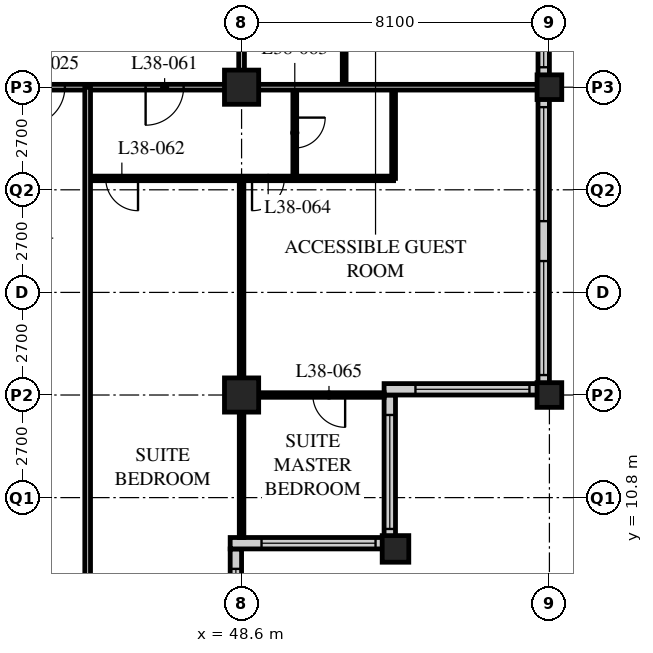
"""IFC4 building model, lengths in metres.
Left out: names, types, materials, properties, quantities, classifications, styles, units other than length and angle.
Written with IfcOpenShell. Run it as: python <this file> out.ifc"""

import sys

from ifc_helpers import new_model, si_unit, direction, frame, frame_2d, origin, origin_2d, place, context, subcontext, project, spatial, rectangle, hollow_rectangle, extrude, element, fill, save


model = new_model("IFC4")
c1 = context("Model", 3, precision=1e-05, world=origin(), true_north=direction((0.0, 1.0)))
c2 = subcontext(c1, "Body", "Model", "MODEL_VIEW")
j1 = project(units=[si_unit("LENGTHUNIT", "METRE"), si_unit("PLANEANGLEUNIT", "RADIAN")], contexts=[c1])
p1 = place(None, origin())
s1 = spatial("IfcSite", under=j1, at=p1, CompositionType="ELEMENT")
p2 = place(p1, origin())
s2 = spatial("IfcBuilding", under=s1, at=p2, CompositionType="ELEMENT")
p3 = place(p2, frame((0.0, 0.0, 147.6)))
s3 = spatial("IfcBuildingStorey", under=s2, at=p3, CompositionType="ELEMENT", Elevation=147.6)
for number, where, z_axis, x_axis in (
    (1, (48.6, 13.5, 0.0), (0.0, 0.0, 1.0), (1.0, 0.0, 0.0)),
    (2, (48.6, 21.6, 0.0), (0.0, 0.0, 1.0), (1.0, 0.0, 0.0)),
):
    element("IfcColumn", number, at=place(p3, frame(where, z_axis=z_axis, x_axis=x_axis)), inside=s3, PredefinedType="COLUMN", context=c2, shape_type="SweptSolid", body=[
        extrude(hollow_rectangle(XDim=0.9, YDim=0.9, WallThickness=0.1, at=origin_2d()), origin(), (0.0, 0.0, 1.0), 3.4),
    ])
p4 = place(p3, frame((52.65, 9.45, 0.0), z_axis=(0.0, 0.0, 1.0), x_axis=(1.0, 0.0, 0.0)))
e3 = element("IfcColumn", 3, at=p4, inside=s3, PredefinedType="COLUMN", context=c2, shape_type="SweptSolid", body=[
    extrude(hollow_rectangle(XDim=0.7, YDim=0.7, WallThickness=0.07, at=origin_2d()), origin(), (0.0, 0.0, 1.0), 3.4),
])
for number, where, z_axis, x_axis in (
    (4, (56.7, 13.5, 0.0), (0.0, 0.0, 1.0), (1.0, 0.0, 0.0)),
    (5, (56.7, 21.6, 0.0), (0.0, 0.0, 1.0), (1.0, 0.0, 0.0)),
):
    element("IfcColumn", number, at=place(p3, frame(where, z_axis=z_axis, x_axis=x_axis)), inside=s3, PredefinedType="COLUMN", context=c2, shape_type="SweptSolid", body=[
        extrude(hollow_rectangle(XDim=0.65, YDim=0.65, WallThickness=0.055, at=origin_2d()), origin(), (0.0, 0.0, 1.0), 3.4),
    ])
p5 = place(p3, frame((48.45, 5.7, 0.0), z_axis=(0.0, 0.0, 1.0), x_axis=(0.0, 1.0, 0.0)))
e6 = element("IfcWall", 6, at=p5, inside=s3, PredefinedType="SOLIDWALL", context=c2, shape_type="SweptSolid", body=[
    extrude(rectangle(XDim=3.75, YDim=0.3, at=frame_2d((1.875, 0.0))), origin(), (0.0, 0.0, 1.0), 3.19),
])
p6 = place(p5, frame((0.225, 0.0, 0.9)))
e7 = element("IfcOpeningElement", 7, at=p6, cuts=e6, PredefinedType="OPENING", context=c2, shape_type="SweptSolid", body=[
    extrude(rectangle(XDim=3.0, YDim=1.4, at=frame_2d((1.5, 0.7))), frame((0.0, 0.16, 0.0), z_axis=(0.0, -1.0, 0.0), x_axis=(1.0, 0.0, 0.0)), (0.0, 0.0, 1.0), 0.32),
])
p7 = place(p3, frame((48.3, 9.6, 0.0), z_axis=(0.0, 0.0, 1.0), x_axis=(1.0, 0.0, 0.0)))
e8 = element("IfcWall", 8, at=p7, inside=s3, PredefinedType="SOLIDWALL", context=c2, shape_type="SweptSolid", body=[
    extrude(rectangle(XDim=4.35, YDim=0.3, at=frame_2d((2.175, 0.0))), origin(), (0.0, 0.0, 1.0), 3.19),
])
p8 = place(p7, frame((0.825, 0.0, 0.9)))
e9 = element("IfcOpeningElement", 9, at=p8, cuts=e8, PredefinedType="OPENING", context=c2, shape_type="SweptSolid", body=[
    extrude(rectangle(XDim=3.0, YDim=1.4, at=frame_2d((1.5, 0.7))), frame((0.0, 0.16, 0.0), z_axis=(0.0, -1.0, 0.0), x_axis=(1.0, 0.0, 0.0)), (0.0, 0.0, 1.0), 0.32),
])
p9 = place(p3, frame((52.5, 9.75, 0.0), z_axis=(0.0, 0.0, 1.0), x_axis=(0.0, 1.0, 0.0)))
e10 = element("IfcWall", 10, at=p9, inside=s3, PredefinedType="SOLIDWALL", context=c2, shape_type="SweptSolid", body=[
    extrude(rectangle(XDim=3.75, YDim=0.3, at=frame_2d((1.875, 0.0))), origin(), (0.0, 0.0, 1.0), 3.19),
])
p10 = place(p9, frame((0.225, 0.0, 0.9)))
e11 = element("IfcOpeningElement", 11, at=p10, cuts=e10, PredefinedType="OPENING", context=c2, shape_type="SweptSolid", body=[
    extrude(rectangle(XDim=3.0, YDim=1.4, at=frame_2d((1.5, 0.7))), frame((0.0, 0.16, 0.0), z_axis=(0.0, -1.0, 0.0), x_axis=(1.0, 0.0, 0.0)), (0.0, 0.0, 1.0), 0.32),
])
p11 = place(p3, frame((52.35, 13.65, 0.0), z_axis=(0.0, 0.0, 1.0), x_axis=(1.0, 0.0, 0.0)))
e12 = element("IfcWall", 12, at=p11, inside=s3, PredefinedType="SOLIDWALL", context=c2, shape_type="SweptSolid", body=[
    extrude(rectangle(XDim=4.35, YDim=0.3, at=frame_2d((2.175, 0.0))), origin(), (0.0, 0.0, 1.0), 3.19),
])
p12 = place(p11, frame((0.825, 0.0, 0.9)))
e13 = element("IfcOpeningElement", 13, at=p12, cuts=e12, PredefinedType="OPENING", context=c2, shape_type="SweptSolid", body=[
    extrude(rectangle(XDim=3.0, YDim=1.4, at=frame_2d((1.5, 0.7))), frame((0.0, 0.16, 0.0), z_axis=(0.0, -1.0, 0.0), x_axis=(1.0, 0.0, 0.0)), (0.0, 0.0, 1.0), 0.32),
])
p13 = place(p3, frame((56.55, 13.8, 0.0), z_axis=(0.0, 0.0, 1.0), x_axis=(0.0, 1.0, 0.0)))
e14 = element("IfcWall", 14, at=p13, inside=s3, PredefinedType="SOLIDWALL", context=c2, shape_type="SweptSolid", body=[
    extrude(rectangle(XDim=32.1, YDim=0.3, at=frame_2d((16.05, 0.0))), origin(), (0.0, 0.0, 1.0), 3.19),
])
p14 = place(p13, frame((0.225, 0.0, 0.9)))
e15 = element("IfcOpeningElement", 15, at=p14, cuts=e14, PredefinedType="OPENING", context=c2, shape_type="SweptSolid", body=[
    extrude(rectangle(XDim=3.0, YDim=1.4, at=frame_2d((1.5, 0.7))), frame((0.0, 0.16, 0.0), z_axis=(0.0, -1.0, 0.0), x_axis=(1.0, 0.0, 0.0)), (0.0, 0.0, 1.0), 0.32),
])
p15 = place(p13, frame((4.275, 0.0, 0.9)))
e16 = element("IfcOpeningElement", 16, at=p15, cuts=e14, PredefinedType="OPENING", context=c2, shape_type="SweptSolid", body=[
    extrude(rectangle(XDim=3.0, YDim=1.4, at=frame_2d((1.5, 0.7))), frame((0.0, 0.16, 0.0), z_axis=(0.0, -1.0, 0.0), x_axis=(1.0, 0.0, 0.0)), (0.0, 0.0, 1.0), 0.32),
])
p16 = place(p13, frame((8.325, 0.0, 0.9)))
e17 = element("IfcOpeningElement", 17, at=p16, cuts=e14, PredefinedType="OPENING", context=c2, shape_type="SweptSolid", body=[
    extrude(rectangle(XDim=3.0, YDim=1.4, at=frame_2d((1.5, 0.7))), frame((0.0, 0.16, 0.0), z_axis=(0.0, -1.0, 0.0), x_axis=(1.0, 0.0, 0.0)), (0.0, 0.0, 1.0), 0.32),
])
p17 = place(p13, frame((12.375, 0.0, 0.9)))
e18 = element("IfcOpeningElement", 18, at=p17, cuts=e14, PredefinedType="OPENING", context=c2, shape_type="SweptSolid", body=[
    extrude(rectangle(XDim=3.0, YDim=1.4, at=frame_2d((1.5, 0.7))), frame((0.0, 0.16, 0.0), z_axis=(0.0, -1.0, 0.0), x_axis=(1.0, 0.0, 0.0)), (0.0, 0.0, 1.0), 0.32),
])
p18 = place(p13, frame((16.425, 0.0, 0.9)))
e19 = element("IfcOpeningElement", 19, at=p18, cuts=e14, PredefinedType="OPENING", context=c2, shape_type="SweptSolid", body=[
    extrude(rectangle(XDim=3.0, YDim=1.4, at=frame_2d((1.5, 0.7))), frame((0.0, 0.16, 0.0), z_axis=(0.0, -1.0, 0.0), x_axis=(1.0, 0.0, 0.0)), (0.0, 0.0, 1.0), 0.32),
])
p19 = place(p13, frame((20.475, 0.0, 0.9)))
e20 = element("IfcOpeningElement", 20, at=p19, cuts=e14, PredefinedType="OPENING", context=c2, shape_type="SweptSolid", body=[
    extrude(rectangle(XDim=3.0, YDim=1.4, at=frame_2d((1.5, 0.7))), frame((0.0, 0.16, 0.0), z_axis=(0.0, -1.0, 0.0), x_axis=(1.0, 0.0, 0.0)), (0.0, 0.0, 1.0), 0.32),
])
p20 = place(p13, frame((24.525, 0.0, 0.9)))
e21 = element("IfcOpeningElement", 21, at=p20, cuts=e14, PredefinedType="OPENING", context=c2, shape_type="SweptSolid", body=[
    extrude(rectangle(XDim=3.0, YDim=1.4, at=frame_2d((1.5, 0.7))), frame((0.0, 0.16, 0.0), z_axis=(0.0, -1.0, 0.0), x_axis=(1.0, 0.0, 0.0)), (0.0, 0.0, 1.0), 0.32),
])
p21 = place(p13, frame((28.575, 0.0, 0.9)))
e22 = element("IfcOpeningElement", 22, at=p21, cuts=e14, PredefinedType="OPENING", context=c2, shape_type="SweptSolid", body=[
    extrude(rectangle(XDim=3.0, YDim=1.4, at=frame_2d((1.5, 0.7))), frame((0.0, 0.16, 0.0), z_axis=(0.0, -1.0, 0.0), x_axis=(1.0, 0.0, 0.0)), (0.0, 0.0, 1.0), 0.32),
])
p22 = place(p3, frame((12.15, 21.6, 0.0), z_axis=(0.0, 0.0, 1.0), x_axis=(1.0, 0.0, 0.0)))
e23 = element("IfcWall", 23, at=p22, inside=s3, PredefinedType="PARTITIONING", context=c2, shape_type="SweptSolid", body=[
    extrude(rectangle(XDim=36.45, YDim=0.15, at=frame_2d((18.225, 0.0))), origin(), (0.0, 0.0, 1.0), 2.42),
])
p23 = place(p22, frame((5.95, 0.0, 0.0)))
e24 = element("IfcOpeningElement", 24, at=p23, cuts=e23, PredefinedType="OPENING", context=c2, shape_type="SweptSolid", body=[
    extrude(rectangle(XDim=1.0, YDim=2.1, at=frame_2d((0.5, 1.05))), frame((0.0, 0.085, 0.0), z_axis=(0.0, -1.0, 0.0), x_axis=(1.0, 0.0, 0.0)), (0.0, 0.0, 1.0), 0.17),
])
p24 = place(p22, frame((14.05, 0.0, 0.0)))
e25 = element("IfcOpeningElement", 25, at=p24, cuts=e23, PredefinedType="OPENING", context=c2, shape_type="SweptSolid", body=[
    extrude(rectangle(XDim=1.0, YDim=2.1, at=frame_2d((0.5, 1.05))), frame((0.0, 0.085, 0.0), z_axis=(0.0, -1.0, 0.0), x_axis=(1.0, 0.0, 0.0)), (0.0, 0.0, 1.0), 0.17),
])
p25 = place(p22, frame((22.15, 0.0, 0.0)))
e26 = element("IfcOpeningElement", 26, at=p25, cuts=e23, PredefinedType="OPENING", context=c2, shape_type="SweptSolid", body=[
    extrude(rectangle(XDim=1.0, YDim=2.1, at=frame_2d((0.5, 1.05))), frame((0.0, 0.085, 0.0), z_axis=(0.0, -1.0, 0.0), x_axis=(1.0, 0.0, 0.0)), (0.0, 0.0, 1.0), 0.17),
])
p26 = place(p22, frame((30.8, 0.0, 0.0)))
e27 = element("IfcOpeningElement", 27, at=p26, cuts=e23, PredefinedType="OPENING", context=c2, shape_type="SweptSolid", body=[
    extrude(rectangle(XDim=1.0, YDim=2.1, at=frame_2d((0.5, 1.05))), frame((0.0, 0.085, 0.0), z_axis=(0.0, -1.0, 0.0), x_axis=(1.0, 0.0, 0.0)), (0.0, 0.0, 1.0), 0.17),
])
p27 = place(p22, frame((1.525, 0.0, 0.0)))
e28 = element("IfcOpeningElement", 28, at=p27, cuts=e23, PredefinedType="OPENING", context=c2, shape_type="SweptSolid", body=[
    extrude(rectangle(XDim=1.0, YDim=2.1, at=frame_2d((0.5, 1.05))), frame((0.0, 0.085, 0.0), z_axis=(0.0, -1.0, 0.0), x_axis=(1.0, 0.0, 0.0)), (0.0, 0.0, 1.0), 0.17),
])
p28 = place(p22, frame((33.925, 0.0, 0.0)))
e29 = element("IfcOpeningElement", 29, at=p28, cuts=e23, PredefinedType="OPENING", context=c2, shape_type="SweptSolid", body=[
    extrude(rectangle(XDim=1.0, YDim=2.1, at=frame_2d((0.5, 1.05))), frame((0.0, 0.085, 0.0), z_axis=(0.0, -1.0, 0.0), x_axis=(1.0, 0.0, 0.0)), (0.0, 0.0, 1.0), 0.17),
])
p29 = place(p3, frame((48.6, 21.6, 0.0), z_axis=(0.0, 0.0, 1.0), x_axis=(0.0, 1.0, 0.0)))
e30 = element("IfcWall", 30, at=p29, inside=s3, PredefinedType="PARTITIONING", context=c2, shape_type="SweptSolid", body=[
    extrude(rectangle(XDim=24.3, YDim=0.15, at=frame_2d((12.15, 0.0))), origin(), (0.0, 0.0, 1.0), 2.42),
])
p30 = place(p29, frame((2.75, 0.0, 0.0)))
e31 = element("IfcOpeningElement", 31, at=p30, cuts=e30, PredefinedType="OPENING", context=c2, shape_type="SweptSolid", body=[
    extrude(rectangle(XDim=1.0, YDim=2.1, at=frame_2d((0.5, 1.05))), frame((0.0, 0.085, 0.0), z_axis=(0.0, -1.0, 0.0), x_axis=(1.0, 0.0, 0.0)), (0.0, 0.0, 1.0), 0.17),
])
p31 = place(p29, frame((4.65, 0.0, 0.0)))
e32 = element("IfcOpeningElement", 32, at=p31, cuts=e30, PredefinedType="OPENING", context=c2, shape_type="SweptSolid", body=[
    extrude(rectangle(XDim=1.0, YDim=2.1, at=frame_2d((0.5, 1.05))), frame((0.0, 0.085, 0.0), z_axis=(0.0, -1.0, 0.0), x_axis=(1.0, 0.0, 0.0)), (0.0, 0.0, 1.0), 0.17),
])
p32 = place(p29, frame((13.675, 0.0, 0.0)))
e33 = element("IfcOpeningElement", 33, at=p32, cuts=e30, PredefinedType="OPENING", context=c2, shape_type="SweptSolid", body=[
    extrude(rectangle(XDim=1.0, YDim=2.1, at=frame_2d((0.5, 1.05))), frame((0.0, 0.085, 0.0), z_axis=(0.0, -1.0, 0.0), x_axis=(1.0, 0.0, 0.0)), (0.0, 0.0, 1.0), 0.17),
])
p33 = place(p29, frame((20.85, 0.0, 0.0)))
e34 = element("IfcOpeningElement", 34, at=p33, cuts=e30, PredefinedType="OPENING", context=c2, shape_type="SweptSolid", body=[
    extrude(rectangle(XDim=1.0, YDim=2.1, at=frame_2d((0.5, 1.05))), frame((0.0, 0.085, 0.0), z_axis=(0.0, -1.0, 0.0), x_axis=(1.0, 0.0, 0.0)), (0.0, 0.0, 1.0), 0.17),
])
p34 = place(p3, frame((51.3, 21.6, 0.0), z_axis=(0.0, 0.0, 1.0), x_axis=(0.0, 1.0, 0.0)))
e35 = element("IfcWall", 35, at=p34, inside=s3, PredefinedType="PARTITIONING", context=c2, shape_type="SweptSolid", body=[
    extrude(rectangle(XDim=2.6, YDim=0.1, at=frame_2d((1.3, 0.0))), origin(), (0.0, 0.0, 1.0), 3.19),
])
p35 = place(p3, frame((44.55, 19.2, 0.0), z_axis=(0.0, 0.0, 1.0), x_axis=(1.0, 0.0, 0.0)))
e36 = element("IfcWall", 36, at=p35, inside=s3, PredefinedType="PARTITIONING", context=c2, shape_type="SweptSolid", body=[
    extrude(rectangle(XDim=8.05, YDim=0.12, at=frame_2d((4.025, 0.0))), origin(), (0.0, 0.0, 1.0), 3.19),
])
p36 = place(p35, frame((0.475, 0.0, 0.0)))
e37 = element("IfcOpeningElement", 37, at=p36, cuts=e36, PredefinedType="OPENING", context=c2, shape_type="SweptSolid", body=[
    extrude(rectangle(XDim=0.85, YDim=2.1, at=frame_2d((0.425, 1.05))), frame((0.0, 0.07, 0.0), z_axis=(0.0, -1.0, 0.0), x_axis=(1.0, 0.0, 0.0)), (0.0, 0.0, 1.0), 0.14),
])
p37 = place(p35, frame((4.325, 0.0, 0.0)))
e38 = element("IfcOpeningElement", 38, at=p37, cuts=e36, PredefinedType="OPENING", context=c2, shape_type="SweptSolid", body=[
    extrude(rectangle(XDim=0.85, YDim=2.1, at=frame_2d((0.425, 1.05))), frame((0.0, 0.07, 0.0), z_axis=(0.0, -1.0, 0.0), x_axis=(1.0, 0.0, 0.0)), (0.0, 0.0, 1.0), 0.14),
])
p38 = place(p3, frame((50.0, 21.6, 0.0), z_axis=(0.0, 0.0, 1.0), x_axis=(0.0, -1.0, 0.0)))
e39 = element("IfcWall", 39, at=p38, inside=s3, PredefinedType="PARTITIONING", context=c2, shape_type="SweptSolid", body=[
    extrude(rectangle(XDim=2.4, YDim=0.1, at=frame_2d((1.2, 0.0))), origin(), (0.0, 0.0, 1.0), 3.19),
])
p39 = place(p38, frame((0.8, 0.0, 0.0)))
e40 = element("IfcOpeningElement", 40, at=p39, cuts=e39, PredefinedType="OPENING", context=c2, shape_type="SweptSolid", body=[
    extrude(rectangle(XDim=0.8, YDim=2.1, at=frame_2d((0.4, 1.05))), frame((0.0, 0.06, 0.0), z_axis=(0.0, -1.0, 0.0), x_axis=(1.0, 0.0, 0.0)), (0.0, 0.0, 1.0), 0.12),
])
p40 = place(p3, frame((52.6, 21.6, 0.0), z_axis=(0.0, 0.0, 1.0), x_axis=(0.0, -1.0, 0.0)))
e41 = element("IfcWall", 41, at=p40, inside=s3, PredefinedType="PARTITIONING", context=c2, shape_type="SweptSolid", body=[
    extrude(rectangle(XDim=2.4, YDim=0.1, at=frame_2d((1.2, 0.0))), origin(), (0.0, 0.0, 1.0), 3.19),
])
p41 = place(p3, frame((48.6, 19.2, 0.0), z_axis=(0.0, 0.0, 1.0), x_axis=(0.0, -1.0, 0.0)))
e42 = element("IfcWall", 42, at=p41, inside=s3, PredefinedType="PARTITIONING", context=c2, shape_type="SweptSolid", body=[
    extrude(rectangle(XDim=9.45, YDim=0.12, at=frame_2d((4.725, 0.0))), origin(), (0.0, 0.0, 1.0), 2.42),
])
p42 = place(p3, frame((48.6, 13.5, 0.0), z_axis=(0.0, 0.0, 1.0), x_axis=(1.0, 0.0, 0.0)))
e43 = element("IfcWall", 43, at=p42, inside=s3, PredefinedType="PARTITIONING", context=c2, shape_type="SweptSolid", body=[
    extrude(rectangle(XDim=3.75, YDim=0.12, at=frame_2d((1.875, 0.0))), origin(), (0.0, 0.0, 1.0), 2.42),
])
p43 = place(p42, frame((1.875, 0.0, 0.0)))
e44 = element("IfcOpeningElement", 44, at=p43, cuts=e43, PredefinedType="OPENING", context=c2, shape_type="SweptSolid", body=[
    extrude(rectangle(XDim=0.85, YDim=2.1, at=frame_2d((0.425, 1.05))), frame((0.0, 0.07, 0.0), z_axis=(0.0, -1.0, 0.0), x_axis=(1.0, 0.0, 0.0)), (0.0, 0.0, 1.0), 0.14),
])
p44 = place(p3, frame((48.6, 21.6, 0.0), z_axis=(0.0, 0.0, 1.0), x_axis=(1.0, 0.0, 0.0)))
e45 = element("IfcWall", 45, at=p44, inside=s3, PredefinedType="PARTITIONING", context=c2, shape_type="SweptSolid", body=[
    extrude(rectangle(XDim=7.8, YDim=0.15, at=frame_2d((3.9, 0.0))), origin(), (0.0, 0.0, 1.0), 2.42),
])
p45 = place(p3, frame((44.55, 21.6, 0.0), z_axis=(0.0, 0.0, 1.0), x_axis=(0.0, -1.0, 0.0)))
e46 = element("IfcWall", 46, at=p45, inside=s3, PredefinedType="PARTITIONING", context=c2, shape_type="SweptSolid", body=[
    extrude(rectangle(XDim=15.9, YDim=0.15, at=frame_2d((7.95, 0.0))), origin(), (0.0, 0.0, 1.0), 3.19),
])
p46 = place(p6, origin())
e47 = element("IfcWindow", 47, at=p46, inside=s3, PartitioningType="SINGLE_PANEL", PredefinedType="WINDOW", context=c2, shape_type="SweptSolid", body=[
    extrude(rectangle(XDim=3.0, YDim=1.4, at=frame_2d((1.5, 0.7))), frame((0.0, 0.03, 0.0), z_axis=(0.0, -1.0, 0.0), x_axis=(1.0, 0.0, 0.0)), (0.0, 0.0, 1.0), 0.06),
])
fill(e7, e47)
p47 = place(p8, origin())
e48 = element("IfcWindow", 48, at=p47, inside=s3, PartitioningType="SINGLE_PANEL", PredefinedType="WINDOW", context=c2, shape_type="SweptSolid", body=[
    extrude(rectangle(XDim=3.0, YDim=1.4, at=frame_2d((1.5, 0.7))), frame((0.0, 0.03, 0.0), z_axis=(0.0, -1.0, 0.0), x_axis=(1.0, 0.0, 0.0)), (0.0, 0.0, 1.0), 0.06),
])
fill(e9, e48)
p48 = place(p10, origin())
e49 = element("IfcWindow", 49, at=p48, inside=s3, PartitioningType="SINGLE_PANEL", PredefinedType="WINDOW", context=c2, shape_type="SweptSolid", body=[
    extrude(rectangle(XDim=3.0, YDim=1.4, at=frame_2d((1.5, 0.7))), frame((0.0, 0.03, 0.0), z_axis=(0.0, -1.0, 0.0), x_axis=(1.0, 0.0, 0.0)), (0.0, 0.0, 1.0), 0.06),
])
fill(e11, e49)
p49 = place(p12, origin())
e50 = element("IfcWindow", 50, at=p49, inside=s3, PartitioningType="SINGLE_PANEL", PredefinedType="WINDOW", context=c2, shape_type="SweptSolid", body=[
    extrude(rectangle(XDim=3.0, YDim=1.4, at=frame_2d((1.5, 0.7))), frame((0.0, 0.03, 0.0), z_axis=(0.0, -1.0, 0.0), x_axis=(1.0, 0.0, 0.0)), (0.0, 0.0, 1.0), 0.06),
])
fill(e13, e50)
p50 = place(p14, origin())
e51 = element("IfcWindow", 51, at=p50, inside=s3, PartitioningType="SINGLE_PANEL", PredefinedType="WINDOW", context=c2, shape_type="SweptSolid", body=[
    extrude(rectangle(XDim=3.0, YDim=1.4, at=frame_2d((1.5, 0.7))), frame((0.0, 0.03, 0.0), z_axis=(0.0, -1.0, 0.0), x_axis=(1.0, 0.0, 0.0)), (0.0, 0.0, 1.0), 0.06),
])
fill(e15, e51)
p51 = place(p15, origin())
e52 = element("IfcWindow", 52, at=p51, inside=s3, PartitioningType="SINGLE_PANEL", PredefinedType="WINDOW", context=c2, shape_type="SweptSolid", body=[
    extrude(rectangle(XDim=3.0, YDim=1.4, at=frame_2d((1.5, 0.7))), frame((0.0, 0.03, 0.0), z_axis=(0.0, -1.0, 0.0), x_axis=(1.0, 0.0, 0.0)), (0.0, 0.0, 1.0), 0.06),
])
fill(e16, e52)
p52 = place(p16, origin())
e53 = element("IfcWindow", 53, at=p52, inside=s3, PartitioningType="SINGLE_PANEL", PredefinedType="WINDOW", context=c2, shape_type="SweptSolid", body=[
    extrude(rectangle(XDim=3.0, YDim=1.4, at=frame_2d((1.5, 0.7))), frame((0.0, 0.03, 0.0), z_axis=(0.0, -1.0, 0.0), x_axis=(1.0, 0.0, 0.0)), (0.0, 0.0, 1.0), 0.06),
])
fill(e17, e53)
p53 = place(p26, origin())
e54 = element("IfcDoor", 54, at=p53, inside=s3, OperationType="SINGLE_SWING_RIGHT", PredefinedType="DOOR", context=c2, shape_type="SweptSolid", body=[
    extrude(rectangle(XDim=1.0, YDim=2.1, at=frame_2d((0.5, 1.05))), frame((0.0, 0.025, 0.0), z_axis=(0.0, -1.0, 0.0), x_axis=(1.0, 0.0, 0.0)), (0.0, 0.0, 1.0), 0.05),
])
fill(e27, e54)
p54 = place(p28, origin())
e55 = element("IfcDoor", 55, at=p54, inside=s3, OperationType="SINGLE_SWING_RIGHT", PredefinedType="DOOR", context=c2, shape_type="SweptSolid", body=[
    extrude(rectangle(XDim=1.0, YDim=2.1, at=frame_2d((0.5, 1.05))), frame((0.0, 0.025, 0.0), z_axis=(0.0, -1.0, 0.0), x_axis=(1.0, 0.0, 0.0)), (0.0, 0.0, 1.0), 0.05),
])
fill(e29, e55)
p55 = place(p36, origin())
e56 = element("IfcDoor", 56, at=p55, inside=s3, OperationType="SINGLE_SWING_LEFT", PredefinedType="DOOR", context=c2, shape_type="SweptSolid", body=[
    extrude(rectangle(XDim=0.85, YDim=2.1, at=frame_2d((0.425, 1.05))), frame((0.0, 0.025, 0.0), z_axis=(0.0, -1.0, 0.0), x_axis=(1.0, 0.0, 0.0)), (0.0, 0.0, 1.0), 0.05),
])
fill(e37, e56)
p56 = place(p39, origin())
e57 = element("IfcDoor", 57, at=p56, inside=s3, OperationType="SINGLE_SWING_LEFT", PredefinedType="DOOR", context=c2, shape_type="SweptSolid", body=[
    extrude(rectangle(XDim=0.8, YDim=2.1, at=frame_2d((0.4, 1.05))), frame((0.0, 0.025, 0.0), z_axis=(0.0, -1.0, 0.0), x_axis=(1.0, 0.0, 0.0)), (0.0, 0.0, 1.0), 0.05),
])
fill(e40, e57)
p57 = place(p37, origin())
e58 = element("IfcDoor", 58, at=p57, inside=s3, OperationType="SINGLE_SWING_RIGHT", PredefinedType="DOOR", context=c2, shape_type="SweptSolid", body=[
    extrude(rectangle(XDim=0.85, YDim=2.1, at=frame_2d((0.425, 1.05))), frame((0.0, 0.025, 0.0), z_axis=(0.0, -1.0, 0.0), x_axis=(1.0, 0.0, 0.0)), (0.0, 0.0, 1.0), 0.05),
])
fill(e38, e58)
p58 = place(p43, origin())
e59 = element("IfcDoor", 59, at=p58, inside=s3, OperationType="SINGLE_SWING_LEFT", PredefinedType="DOOR", context=c2, shape_type="SweptSolid", body=[
    extrude(rectangle(XDim=0.85, YDim=2.1, at=frame_2d((0.425, 1.05))), frame((0.0, 0.025, 0.0), z_axis=(0.0, -1.0, 0.0), x_axis=(1.0, 0.0, 0.0)), (0.0, 0.0, 1.0), 0.05),
])
fill(e44, e59)
save(model, sys.argv[1])
